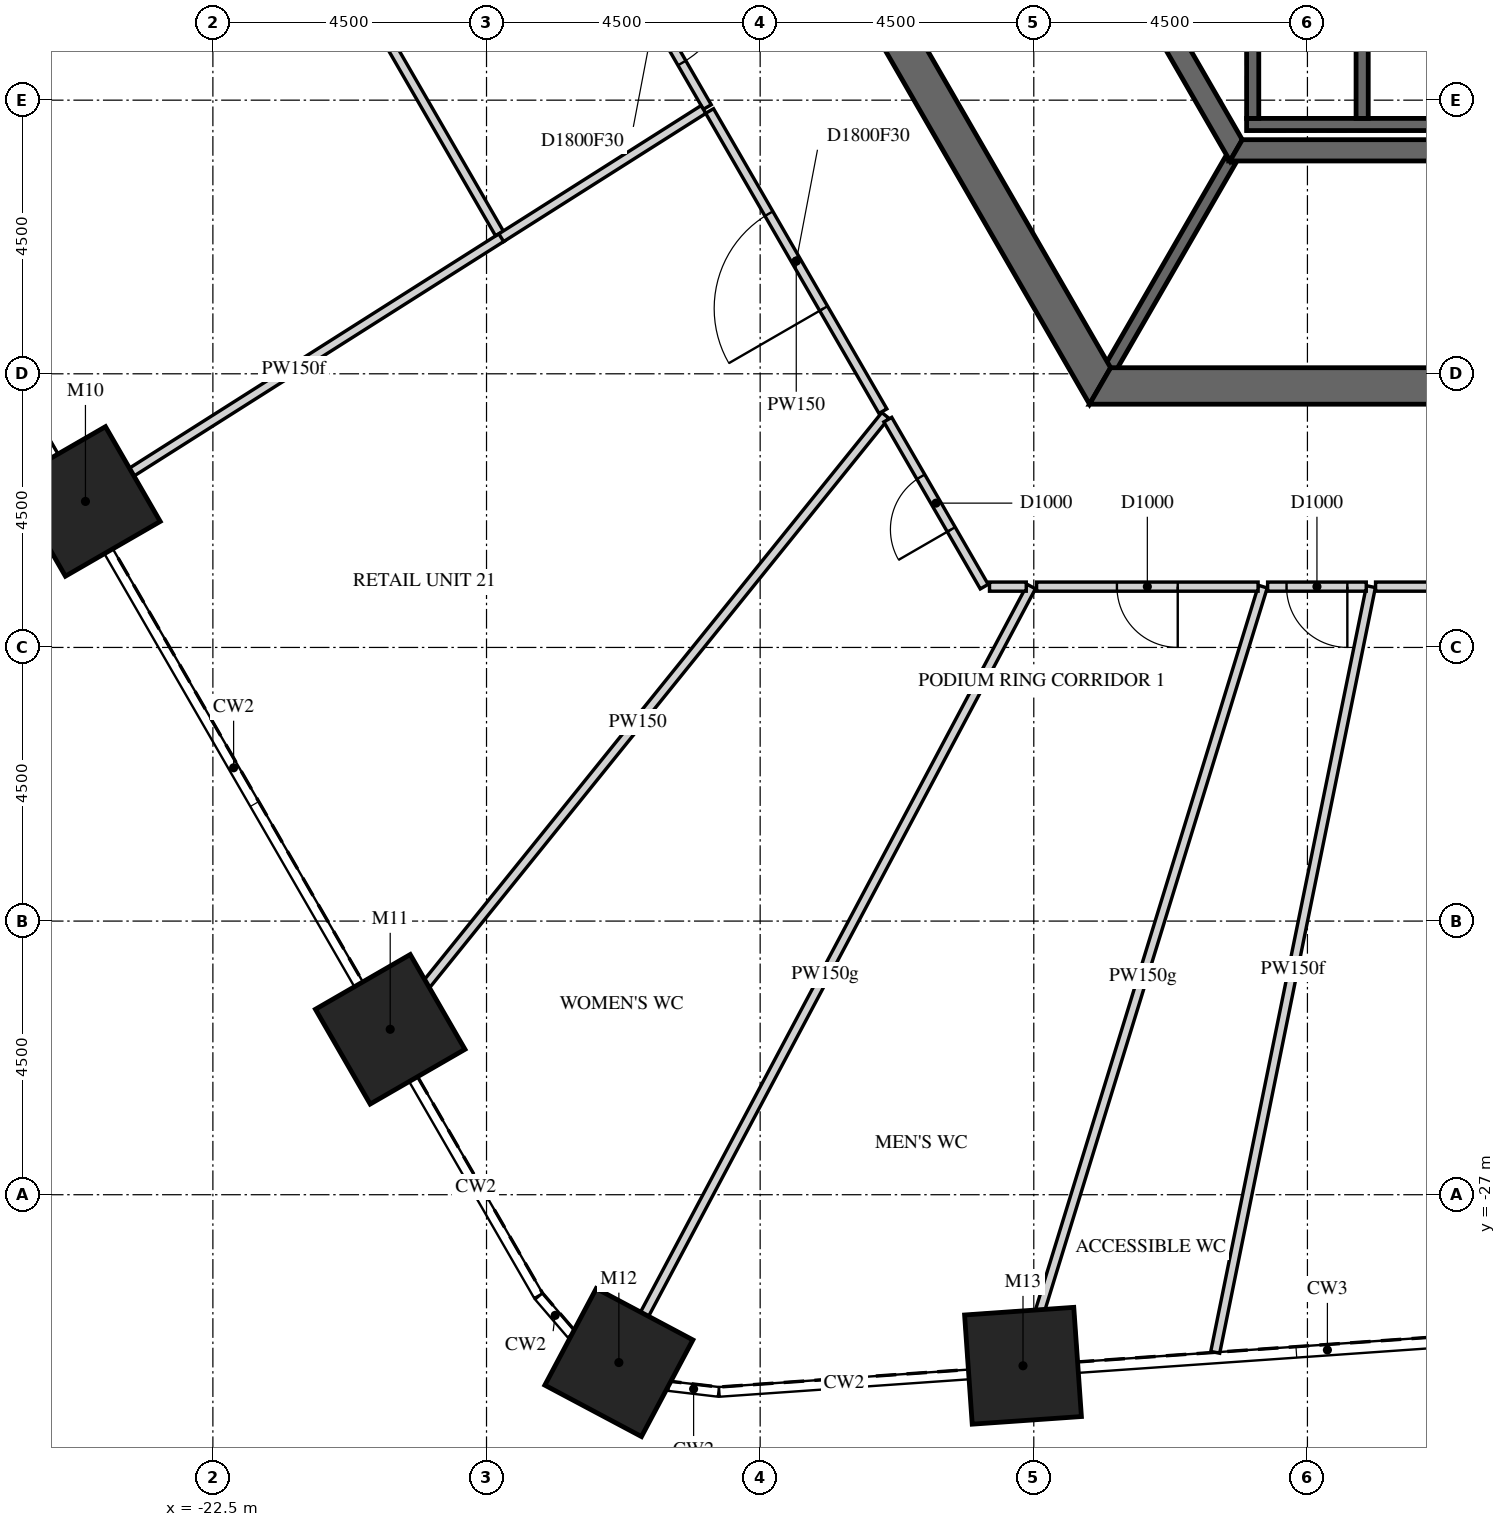
"""IFC4 building model, lengths in metres.
Left out: names, types, materials, properties, quantities, classifications, styles, units other than length and angle.
Written with IfcOpenShell. Run it as: python <this file> out.ifc"""

import sys

from ifc_helpers import new_model, si_unit, direction, frame, frame_2d, origin, origin_2d, place, context, subcontext, project, spatial, polyline, rectangle, outline, extrude, element, fill, save


model = new_model("IFC4")
c1 = context("Model", 3, precision=1e-05, world=origin(), true_north=direction((0.0, 1.0)))
c2 = subcontext(c1, "Body", "Model", "MODEL_VIEW")
j1 = project(units=[si_unit("LENGTHUNIT", "METRE"), si_unit("PLANEANGLEUNIT", "RADIAN")], contexts=[c1])
p1 = place(None, origin())
s1 = spatial("IfcSite", under=j1, at=p1, CompositionType="ELEMENT")
p2 = place(p1, origin())
s2 = spatial("IfcBuilding", under=s1, at=p2, CompositionType="ELEMENT")
p3 = place(p2, frame((0.0, 0.0, 15.0)))
s3 = spatial("IfcBuildingStorey", under=s2, at=p3, CompositionType="ELEMENT", Elevation=15.0)
for number, where, z_axis, x_axis in (
    (1, (-24.596, -15.599, -0.25), (0.0, 0.0, 1.0), (-0.5, 0.866, 0.0)),
    (2, (-19.584, -24.28, -0.25), (0.0, 0.0, 1.0), (-0.5, 0.866, 0.0)),
    (3, (-15.823, -29.76, -0.25), (0.0, 0.0, 1.0), (-0.883, 0.469, 0.0)),
    (4, (-9.177, -29.813, -0.25), (0.0, 0.0, 1.0), (-0.998, -0.07, 0.0)),
):
    element("IfcColumn", number, at=place(p3, frame(where, z_axis=z_axis, x_axis=x_axis)), inside=s3, PredefinedType="COLUMN", context=c2, shape_type="SweptSolid", body=[
        extrude(rectangle(XDim=1.8, YDim=1.8, at=origin_2d()), origin(), (0.0, 0.0, 1.0), 5.5),
    ])
p4 = place(p3, frame((-15.819, 0.0, -0.25), z_axis=(0.0, 0.0, 1.0), x_axis=(0.499999880136, -0.866025472988, 0.0)))
e5 = element("IfcWall", 5, at=p4, inside=s3, PredefinedType="SHEAR", context=c2, shape_type="SweptSolid", body=[
    extrude(outline(polyline([(-0.173, -0.3), (15.993, -0.3), (15.646, 0.3), (0.173, 0.3), (-0.173, -0.3)])), origin(), (0.0, 0.0, 1.0), 5.5),
])
p5 = place(p4, frame((6.981, 0.0, 0.25)))
e6 = element("IfcOpeningElement", 6, at=p5, cuts=e5, PredefinedType="OPENING", context=c2, shape_type="SweptSolid", body=[
    extrude(rectangle(XDim=1.8, YDim=2.4, at=frame_2d((0.9, 1.2))), frame((0.0, 0.31, 0.0), z_axis=(0.0, -1.0, 0.0), x_axis=(1.0, 0.0, 0.0)), (0.0, 0.0, 1.0), 0.62),
])
p6 = place(p3, frame((-7.91, -13.7, -0.25), z_axis=(0.0, 0.0, 1.0), x_axis=(1.0, 0.0, 0.0)))
e7 = element("IfcWall", 7, at=p6, inside=s3, PredefinedType="SHEAR", context=c2, shape_type="SweptSolid", body=[
    extrude(outline(polyline([(-0.173, -0.3), (15.993, -0.3), (15.646, 0.3), (0.173, 0.3), (-0.173, -0.3)])), origin(), (0.0, 0.0, 1.0), 5.5),
])
p7 = place(p6, frame((7.31, 0.0, 0.25)))
e8 = element("IfcOpeningElement", 8, at=p7, cuts=e7, PredefinedType="OPENING", context=c2, shape_type="SweptSolid", body=[
    extrude(rectangle(XDim=1.2, YDim=2.4, at=frame_2d((0.6, 1.2))), frame((0.0, 0.31, 0.0), z_axis=(0.0, -1.0, 0.0), x_axis=(1.0, 0.0, 0.0)), (0.0, 0.0, 1.0), 0.62),
])
p8 = place(p3, frame((-11.345, 0.0, -0.25), z_axis=(0.0, 0.0, 1.0), x_axis=(0.499995046907, -0.866028263435, 0.0)))
e9 = element("IfcWall", 9, at=p8, inside=s3, PredefinedType="SHEAR", context=c2, shape_type="SweptSolid", body=[
    extrude(outline(polyline([(-0.101, -0.175), (11.446, -0.175), (11.244, 0.175), (0.101, 0.175), (-0.101, -0.175)])), origin(), (0.0, 0.0, 1.0), 5.5),
])
p9 = place(p8, frame((4.744, 0.0, 0.25)))
e10 = element("IfcOpeningElement", 10, at=p9, cuts=e9, PredefinedType="OPENING", context=c2, shape_type="SweptSolid", body=[
    extrude(rectangle(XDim=1.8, YDim=2.4, at=frame_2d((0.9, 1.2))), frame((0.0, 0.185, 0.0), z_axis=(0.0, -1.0, 0.0), x_axis=(1.0, 0.0, 0.0)), (0.0, 0.0, 1.0), 0.37),
])
p10 = place(p3, frame((-5.673, -9.825, -0.25), z_axis=(0.0, 0.0, 1.0), x_axis=(1.0, 0.0, 0.0)))
e11 = element("IfcWall", 11, at=p10, inside=s3, PredefinedType="SHEAR", context=c2, shape_type="SweptSolid", body=[
    extrude(outline(polyline([(-0.101, -0.175), (11.446, -0.175), (11.244, 0.175), (0.101, 0.175), (-0.101, -0.175)])), origin(), (0.0, 0.0, 1.0), 5.5),
])
p11 = place(p3, frame((-5.5, -9.4, -0.25), z_axis=(0.0, 0.0, 1.0), x_axis=(1.0, 0.0, 0.0)))
e12 = element("IfcWall", 12, at=p11, inside=s3, PredefinedType="SHEAR", context=c2, shape_type="SweptSolid", body=[
    extrude(rectangle(XDim=9.2, YDim=0.2, at=frame_2d((4.6, 0.0))), origin(), (0.0, 0.0, 1.0), 5.5),
])
for number, where, z_axis, x_axis in (
    (13, (-5.4, -9.3, -0.25), (0.0, 0.0, 1.0), (0.0, 1.0, 0.0)),
    (14, (-3.6, -9.3, -0.25), (0.0, 0.0, 1.0), (0.0, 1.0, 0.0)),
):
    element("IfcWall", number, at=place(p3, frame(where, z_axis=z_axis, x_axis=x_axis)), inside=s3, PredefinedType="SHEAR", context=c2, shape_type="SweptSolid", body=[
        extrude(rectangle(XDim=2.9, YDim=0.2, at=frame_2d((1.45, 0.0))), origin(), (0.0, 0.0, 1.0), 5.5),
    ])
p12 = place(p3, frame((-5.773, -10.0, -0.25), z_axis=(0.0, 0.0, 1.0), x_axis=(-0.500038251005, -0.86600331843, 0.0)))
e15 = element("IfcWall", 15, at=p12, inside=s3, PredefinedType="SHEAR", context=c2, shape_type="SweptSolid", body=[
    extrude(rectangle(XDim=3.926, YDim=0.2, at=frame_2d((1.963, 0.0))), origin(), (0.0, 0.0, 1.0), 5.5),
])
p13 = place(p3, frame((-24.596, -15.599, 0.0), z_axis=(0.0, 0.0, 1.0), x_axis=(0.844468094915, 0.535605859445, 0.0)))
e16 = element("IfcWall", 16, at=p13, inside=s3, PredefinedType="PARTITIONING", context=c2, shape_type="SweptSolid", body=[
    extrude(rectangle(XDim=8.116, YDim=0.15, at=frame_2d((4.058, 0.0))), origin(), (0.0, 0.0, 1.0), 4.496),
])
p14 = place(p3, frame((-23.239, -1.75, 0.0), z_axis=(0.0, 0.0, 1.0), x_axis=(0.499992537871, -0.866029712004, 0.0)))
e17 = element("IfcWall", 17, at=p14, inside=s3, PredefinedType="PARTITIONING", context=c2, shape_type="SweptSolid", body=[
    extrude(rectangle(XDim=10.903, YDim=0.15, at=frame_2d((5.451, 0.0))), origin(), (0.0, 0.0, 1.0), 5.25),
])
p15 = place(p3, frame((-19.584, -24.28, 0.0), z_axis=(0.0, 0.0, 1.0), x_axis=(0.627807267634, 0.77836882948, 0.0)))
e18 = element("IfcWall", 18, at=p15, inside=s3, PredefinedType="PARTITIONING", context=c2, shape_type="SweptSolid", body=[
    extrude(rectangle(XDim=12.971, YDim=0.15, at=frame_2d((6.485, 0.0))), origin(), (0.0, 0.0, 1.0), 5.25),
])
p16 = place(p3, frame((-18.649, -1.7, 0.0), z_axis=(0.0, 0.0, 1.0), x_axis=(0.499985805234, -0.866033598981, 0.0)))
e19 = element("IfcWall", 19, at=p16, inside=s3, PredefinedType="PARTITIONING", context=c2, shape_type="SweptSolid", body=[
    extrude(rectangle(XDim=8.56, YDim=0.15, at=frame_2d((4.28, 0.0))), origin(), (0.0, 0.0, 1.0), 5.25),
])
p17 = place(p16, frame((0.836, 0.0, 0.0)))
e20 = element("IfcOpeningElement", 20, at=p17, cuts=e19, PredefinedType="OPENING", context=c2, shape_type="SweptSolid", body=[
    extrude(rectangle(XDim=1.8, YDim=2.1, at=frame_2d((0.9, 1.05))), frame((0.0, 0.085, 0.0), z_axis=(0.0, -1.0, 0.0), x_axis=(1.0, 0.0, 0.0)), (0.0, 0.0, 1.0), 0.17),
])
p18 = place(p16, frame((3.38, 0.0, 0.0)))
e21 = element("IfcOpeningElement", 21, at=p18, cuts=e19, PredefinedType="OPENING", context=c2, shape_type="SweptSolid", body=[
    extrude(rectangle(XDim=1.8, YDim=2.1, at=frame_2d((0.9, 1.05))), frame((0.0, 0.085, 0.0), z_axis=(0.0, -1.0, 0.0), x_axis=(1.0, 0.0, 0.0)), (0.0, 0.0, 1.0), 0.17),
])
p19 = place(p16, frame((5.924, 0.0, 0.0)))
e22 = element("IfcOpeningElement", 22, at=p19, cuts=e19, PredefinedType="OPENING", context=c2, shape_type="SweptSolid", body=[
    extrude(rectangle(XDim=1.8, YDim=2.1, at=frame_2d((0.9, 1.05))), frame((0.0, 0.085, 0.0), z_axis=(0.0, -1.0, 0.0), x_axis=(1.0, 0.0, 0.0)), (0.0, 0.0, 1.0), 0.17),
])
p20 = place(p3, frame((-17.758, -11.262, 0.0), z_axis=(0.0, 0.0, 1.0), x_axis=(0.844546191186, 0.53548270836, 0.0)))
e23 = element("IfcWall", 23, at=p20, inside=s3, PredefinedType="PARTITIONING", context=c2, shape_type="SweptSolid", body=[
    extrude(rectangle(XDim=3.938, YDim=0.15, at=frame_2d((1.969, 0.0))), origin(), (0.0, 0.0, 1.0), 4.496),
])
p21 = place(p3, frame((-15.824, -29.76, 0.0), z_axis=(0.0, 0.0, 1.0), x_axis=(0.469487453171, 0.882939143608, 0.0)))
e24 = element("IfcWall", 24, at=p21, inside=s3, PredefinedType="PARTITIONING", context=c2, shape_type="SweptSolid", body=[
    extrude(rectangle(XDim=14.452, YDim=0.15, at=frame_2d((7.226, 0.0))), origin(), (0.0, 0.0, 1.0), 4.488),
])
p22 = place(p3, frame((-11.481, -14.114, 0.0), z_axis=(0.0, 0.0, 1.0), x_axis=(-0.500049947645, 0.865996564577, 0.0)))
e25 = element("IfcWall", 25, at=p22, inside=s3, PredefinedType="PARTITIONING", context=c2, shape_type="SweptSolid", body=[
    extrude(rectangle(XDim=5.7, YDim=0.15, at=frame_2d((2.85, 0.0))), origin(), (0.0, 0.0, 1.0), 5.25),
])
p23 = place(p22, frame((1.95, 0.0, 0.0)))
e26 = element("IfcOpeningElement", 26, at=p23, cuts=e25, PredefinedType="OPENING", context=c2, shape_type="SweptSolid", body=[
    extrude(rectangle(XDim=1.8, YDim=2.1, at=frame_2d((0.9, 1.05))), frame((0.0, 0.085, 0.0), z_axis=(0.0, -1.0, 0.0), x_axis=(1.0, 0.0, 0.0)), (0.0, 0.0, 1.0), 0.17),
])
p24 = place(p3, frame((-9.815, -17.0, 0.0), z_axis=(0.0, 0.0, 1.0), x_axis=(-0.500080068905, 0.865979171045, 0.0)))
e27 = element("IfcWall", 27, at=p24, inside=s3, PredefinedType="PARTITIONING", context=c2, shape_type="SweptSolid", body=[
    extrude(rectangle(XDim=3.171, YDim=0.15, at=frame_2d((1.586, 0.0))), origin(), (0.0, 0.0, 1.0), 5.25),
])
p25 = place(p24, frame((1.086, 0.0, 0.0)))
e28 = element("IfcOpeningElement", 28, at=p25, cuts=e27, PredefinedType="OPENING", context=c2, shape_type="SweptSolid", body=[
    extrude(rectangle(XDim=1.0, YDim=2.1, at=frame_2d((0.5, 1.05))), frame((0.0, 0.085, 0.0), z_axis=(0.0, -1.0, 0.0), x_axis=(1.0, 0.0, 0.0)), (0.0, 0.0, 1.0), 0.17),
])
p26 = place(p3, frame((-9.729, -17.0, 0.0), z_axis=(0.0, 0.0, 1.0), x_axis=(1.0, 0.0, 0.0)))
e29 = element("IfcWall", 29, at=p26, inside=s3, PredefinedType="PARTITIONING", context=c2, shape_type="SweptSolid", body=[
    extrude(rectangle(XDim=0.604, YDim=0.15, at=frame_2d((0.302, 0.0))), origin(), (0.0, 0.0, 1.0), 5.25),
])
p27 = place(p3, frame((-9.177, -29.813, 0.0), z_axis=(0.0, 0.0, 1.0), x_axis=(0.29419717946, 0.955744746048, 0.0)))
e30 = element("IfcWall", 30, at=p27, inside=s3, PredefinedType="PARTITIONING", context=c2, shape_type="SweptSolid", body=[
    extrude(rectangle(XDim=13.406, YDim=0.15, at=frame_2d((6.703, 0.0))), origin(), (0.0, 0.0, 1.0), 4.488),
])
p28 = place(p3, frame((-5.312, -17.0, 0.0), z_axis=(0.0, 0.0, 1.0), x_axis=(-1.0, 0.0, 0.0)))
e31 = element("IfcWall", 31, at=p28, inside=s3, PredefinedType="PARTITIONING", context=c2, shape_type="SweptSolid", body=[
    extrude(rectangle(XDim=3.643, YDim=0.15, at=frame_2d((1.821, 0.0))), origin(), (0.0, 0.0, 1.0), 5.25),
])
p29 = place(p28, frame((1.321, 0.0, 0.0)))
e32 = element("IfcOpeningElement", 32, at=p29, cuts=e31, PredefinedType="OPENING", context=c2, shape_type="SweptSolid", body=[
    extrude(rectangle(XDim=1.0, YDim=2.1, at=frame_2d((0.5, 1.05))), frame((0.0, 0.085, 0.0), z_axis=(0.0, -1.0, 0.0), x_axis=(1.0, 0.0, 0.0)), (0.0, 0.0, 1.0), 0.17),
])
p30 = place(p3, frame((-6.016, -29.592, 0.0), z_axis=(0.0, 0.0, 1.0), x_axis=(0.199231841521, 0.979952383192, 0.0)))
e33 = element("IfcWall", 33, at=p30, inside=s3, PredefinedType="PARTITIONING", context=c2, shape_type="SweptSolid", body=[
    extrude(rectangle(XDim=12.85, YDim=0.15, at=frame_2d((6.425, 0.0))), origin(), (0.0, 0.0, 1.0), 4.496),
])
p31 = place(p3, frame((-3.532, -17.0, 0.0), z_axis=(0.0, 0.0, 1.0), x_axis=(-1.0, 0.0, 0.0)))
e34 = element("IfcWall", 34, at=p31, inside=s3, PredefinedType="PARTITIONING", context=c2, shape_type="SweptSolid", body=[
    extrude(rectangle(XDim=1.622, YDim=0.15, at=frame_2d((0.811, 0.0))), origin(), (0.0, 0.0, 1.0), 5.25),
])
p32 = place(p31, frame((0.311, 0.0, 0.0)))
e35 = element("IfcOpeningElement", 35, at=p32, cuts=e34, PredefinedType="OPENING", context=c2, shape_type="SweptSolid", body=[
    extrude(rectangle(XDim=1.0, YDim=2.1, at=frame_2d((0.5, 1.05))), frame((0.0, 0.085, 0.0), z_axis=(0.0, -1.0, 0.0), x_axis=(1.0, 0.0, 0.0)), (0.0, 0.0, 1.0), 0.17),
])
p33 = place(p3, frame((-3.379, -17.0, 0.0), z_axis=(0.0, 0.0, 1.0), x_axis=(1.0, 0.0, 0.0)))
e36 = element("IfcWall", 36, at=p33, inside=s3, PredefinedType="PARTITIONING", context=c2, shape_type="SweptSolid", body=[
    extrude(rectangle(XDim=3.379, YDim=0.15, at=frame_2d((1.69, 0.0))), origin(), (0.0, 0.0, 1.0), 5.25),
])
p34 = place(p19, origin())
e37 = element("IfcDoor", 37, at=p34, inside=s3, OperationType="DOUBLE_DOOR_SINGLE_SWING", PredefinedType="DOOR", context=c2, shape_type="SweptSolid", body=[
    extrude(rectangle(XDim=1.8, YDim=2.1, at=frame_2d((0.9, 1.05))), frame((0.0, 0.025, 0.0), z_axis=(0.0, -1.0, 0.0), x_axis=(1.0, 0.0, 0.0)), (0.0, 0.0, 1.0), 0.05),
])
fill(e22, e37)
p35 = place(p23, origin())
e38 = element("IfcDoor", 38, at=p35, inside=s3, OperationType="DOUBLE_DOOR_SINGLE_SWING", PredefinedType="DOOR", context=c2, shape_type="SweptSolid", body=[
    extrude(rectangle(XDim=1.8, YDim=2.1, at=frame_2d((0.9, 1.05))), frame((0.0, 0.025, 0.0), z_axis=(0.0, -1.0, 0.0), x_axis=(1.0, 0.0, 0.0)), (0.0, 0.0, 1.0), 0.05),
])
fill(e26, e38)
p36 = place(p25, origin())
e39 = element("IfcDoor", 39, at=p36, inside=s3, OperationType="SINGLE_SWING_LEFT", PredefinedType="DOOR", context=c2, shape_type="SweptSolid", body=[
    extrude(rectangle(XDim=1.0, YDim=2.1, at=frame_2d((0.5, 1.05))), frame((0.0, 0.025, 0.0), z_axis=(0.0, -1.0, 0.0), x_axis=(1.0, 0.0, 0.0)), (0.0, 0.0, 1.0), 0.05),
])
fill(e28, e39)
p37 = place(p29, origin())
e40 = element("IfcDoor", 40, at=p37, inside=s3, OperationType="SINGLE_SWING_RIGHT", PredefinedType="DOOR", context=c2, shape_type="SweptSolid", body=[
    extrude(rectangle(XDim=1.0, YDim=2.1, at=frame_2d((0.5, 1.05))), frame((0.0, 0.025, 0.0), z_axis=(0.0, -1.0, 0.0), x_axis=(1.0, 0.0, 0.0)), (0.0, 0.0, 1.0), 0.05),
])
fill(e32, e40)
p38 = place(p32, origin())
e41 = element("IfcDoor", 41, at=p38, inside=s3, OperationType="SINGLE_SWING_LEFT", PredefinedType="DOOR", context=c2, shape_type="SweptSolid", body=[
    extrude(rectangle(XDim=1.0, YDim=2.1, at=frame_2d((0.5, 1.05))), frame((0.0, 0.025, 0.0), z_axis=(0.0, -1.0, 0.0), x_axis=(1.0, 0.0, 0.0)), (0.0, 0.0, 1.0), 0.05),
])
fill(e35, e41)
save(model, sys.argv[1])
